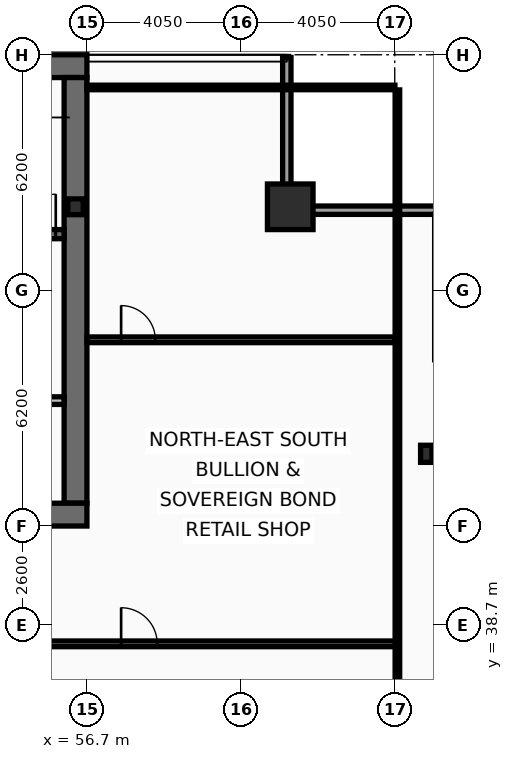
"""IFC4 building model, lengths in metres.
Left out: names, types, materials, properties, quantities, classifications, styles, units other than length and angle.
Written with IfcOpenShell. Run it as: python <this file> out.ifc"""

import sys

from ifc_helpers import new_model, si_unit, direction, frame, frame_2d, origin, origin_2d, place, context, subcontext, project, spatial, rectangle, hollow_rectangle, i_section, extrude, element, fill, save


model = new_model("IFC4")
c1 = context("Model", 3, precision=1e-05, world=origin(), true_north=direction((0.0, 1.0)))
c2 = subcontext(c1, "Body", "Model", "MODEL_VIEW")
j1 = project(units=[si_unit("LENGTHUNIT", "METRE"), si_unit("PLANEANGLEUNIT", "RADIAN")], contexts=[c1])
p1 = place(None, origin())
s1 = spatial("IfcSite", under=j1, at=p1, CompositionType="ELEMENT")
p2 = place(p1, origin())
s2 = spatial("IfcBuilding", under=s1, at=p2, CompositionType="ELEMENT")
p3 = place(p2, frame((0.0, 0.0, 195.8)))
s3 = spatial("IfcBuildingStorey", under=s2, at=p3, CompositionType="ELEMENT", Elevation=195.8)
p4 = place(p3, frame((16.2, 53.4, 0.0), z_axis=(0.0, 0.0, 1.0), x_axis=(1.0, 0.0, 0.0)))
e1 = element("IfcWall", 1, at=p4, inside=s3, PredefinedType="SHEAR", context=c2, shape_type="SweptSolid", body=[
    extrude(rectangle(XDim=40.5, YDim=0.6, at=frame_2d((20.25, 0.0))), origin(), (0.0, 0.0, 1.0), 3.44),
])
p5 = place(p3, frame((56.4, 53.1, 0.0), z_axis=(0.0, 0.0, 1.0), x_axis=(0.0, -1.0, 0.0)))
e2 = element("IfcWall", 2, at=p5, inside=s3, PredefinedType="SHEAR", context=c2, shape_type="SweptSolid", body=[
    extrude(rectangle(XDim=11.2, YDim=0.6, at=frame_2d((5.6, 0.0))), origin(), (0.0, 0.0, 1.0), 3.44),
])
p6 = place(p3, frame((56.7, 41.6, 0.0), z_axis=(0.0, 0.0, 1.0), x_axis=(-1.0, 0.0, 0.0)))
e3 = element("IfcWall", 3, at=p6, inside=s3, PredefinedType="SHEAR", context=c2, shape_type="SweptSolid", body=[
    extrude(rectangle(XDim=2.45, YDim=0.6, at=frame_2d((1.225, 0.0))), origin(), (0.0, 0.0, 1.0), 3.44),
])
p7 = place(p3, frame((48.63, 48.98, 0.0), z_axis=(0.0, 0.0, 1.0), x_axis=(1.0, 0.0, 0.0)))
e4 = element("IfcWall", 4, at=p7, inside=s3, PredefinedType="SHEAR", context=c2, shape_type="SweptSolid", body=[
    extrude(rectangle(XDim=7.47, YDim=0.24, at=frame_2d((3.735, 0.0))), origin(), (0.0, 0.0, 1.0), 3.44),
])
p8 = place(p7, frame((6.2, 0.0, 0.0)))
e5 = element("IfcOpeningElement", 5, at=p8, cuts=e4, PredefinedType="OPENING", context=c2, shape_type="SweptSolid", body=[
    extrude(rectangle(XDim=1.05, YDim=2.15, at=frame_2d((0.525, 1.075))), frame((0.0, 0.13, 0.0), z_axis=(0.0, -1.0, 0.0), x_axis=(1.0, 0.0, 0.0)), (0.0, 0.0, 1.0), 0.26),
])
p9 = place(p3, frame((62.05, 49.7, 0.0), z_axis=(0.0, 0.0, 1.0), x_axis=(1.0, 0.0, 0.0)))
e6 = element("IfcColumn", 6, at=p9, inside=s3, PredefinedType="COLUMN", context=c2, shape_type="SweptSolid", body=[
    extrude(hollow_rectangle(XDim=1.2, YDim=1.2, WallThickness=0.06, at=origin_2d()), origin(), (0.0, 0.0, 1.0), 3.6),
])
p10 = place(p3, frame((65.63, 43.2, 0.0), z_axis=(0.0, 0.0, 1.0), x_axis=(1.0, 0.0, 0.0)))
e7 = element("IfcColumn", 7, at=p10, inside=s3, PredefinedType="COLUMN", context=c2, shape_type="SweptSolid", body=[
    extrude(i_section(OverallWidth=0.3, OverallDepth=0.45, WebThickness=0.014, FlangeThickness=0.026, at=origin_2d()), origin(), (0.0, 0.0, 1.0), 3.6),
])
p11 = place(p3, frame((56.4, 49.7, 0.0), z_axis=(0.0, 0.0, 1.0), x_axis=(1.0, 0.0, 0.0)))
e8 = element("IfcColumn", 8, at=p11, inside=s3, PredefinedType="COLUMN", context=c2, shape_type="SweptSolid", body=[
    extrude(i_section(OverallWidth=0.406, OverallDepth=0.416, WebThickness=0.03, FlangeThickness=0.048, at=origin_2d()), origin(), (0.0, 0.0, 1.0), 3.6),
])
p12 = place(p3, frame((61.96, 53.63, 0.0), z_axis=(0.0, 0.0, 1.0), x_axis=(0.0, -1.0, 0.0)))
e9 = element("IfcWall", 9, at=p12, inside=s3, PredefinedType="SOLIDWALL", context=c2, shape_type="SweptSolid", body=[
    extrude(rectangle(XDim=3.91, YDim=0.22, at=frame_2d((1.955, 0.0))), origin(), (0.0, 0.0, 1.0), 2.83),
])
p13 = place(p3, frame((61.85, 49.61, 0.0), z_axis=(0.0, 0.0, 1.0), x_axis=(1.0, 0.0, 0.0)))
e10 = element("IfcWall", 10, at=p13, inside=s3, PredefinedType="SOLIDWALL", context=c2, shape_type="SweptSolid", body=[
    extrude(rectangle(XDim=4.22, YDim=0.22, at=frame_2d((2.11, 0.0))), origin(), (0.0, 0.0, 1.0), 2.83),
])
p14 = place(p3, frame((51.9, 44.6, 0.0), z_axis=(0.0, 0.0, 1.0), x_axis=(1.0, 0.0, 0.0)))
e11 = element("IfcWall", 11, at=p14, inside=s3, PredefinedType="PARTITIONING", context=c2, shape_type="SweptSolid", body=[
    extrude(rectangle(XDim=4.2, YDim=0.2, at=frame_2d((2.1, 0.0))), origin(), (0.0, 0.0, 1.0), 3.44),
])
p15 = place(p14, frame((1.15, 0.0, 0.0)))
e12 = element("IfcOpeningElement", 12, at=p15, cuts=e11, PredefinedType="OPENING", context=c2, shape_type="SweptSolid", body=[
    extrude(rectangle(XDim=1.05, YDim=2.15, at=frame_2d((0.525, 1.075))), frame((0.0, 0.11, 0.0), z_axis=(0.0, -1.0, 0.0), x_axis=(1.0, 0.0, 0.0)), (0.0, 0.0, 1.0), 0.22),
])
p16 = place(p3, frame((54.35, 38.2, 0.0), z_axis=(0.0, 0.0, 1.0), x_axis=(1.0, 0.0, 0.0)))
e13 = element("IfcWall", 13, at=p16, inside=s3, PredefinedType="PARTITIONING", context=c2, shape_type="SweptSolid", body=[
    extrude(rectangle(XDim=10.52, YDim=0.15, at=frame_2d((5.26, 0.0))), origin(), (0.0, 0.0, 1.0), 2.73),
])
p17 = place(p16, frame((3.25, 0.0, 0.0)))
e14 = element("IfcOpeningElement", 14, at=p17, cuts=e13, PredefinedType="OPENING", context=c2, shape_type="SweptSolid", body=[
    extrude(rectangle(XDim=0.95, YDim=2.05, at=frame_2d((0.475, 1.025))), frame((0.0, 0.085, 0.0), z_axis=(0.0, -1.0, 0.0), x_axis=(1.0, 0.0, 0.0)), (0.0, 0.0, 1.0), 0.17),
])
p18 = place(p3, frame((56.7, 46.2, 0.0), z_axis=(0.0, 0.0, 1.0), x_axis=(1.0, 0.0, 0.0)))
e15 = element("IfcWall", 15, at=p18, inside=s3, PredefinedType="PARTITIONING", context=c2, shape_type="SweptSolid", body=[
    extrude(rectangle(XDim=8.105, YDim=0.15, at=frame_2d((4.052, 0.0))), origin(), (0.0, 0.0, 1.0), 2.83),
])
p19 = place(p18, frame((0.9, 0.0, 0.0)))
e16 = element("IfcOpeningElement", 16, at=p19, cuts=e15, PredefinedType="OPENING", context=c2, shape_type="SweptSolid", body=[
    extrude(rectangle(XDim=0.9, YDim=2.05, at=frame_2d((0.45, 1.025))), frame((0.0, 0.085, 0.0), z_axis=(0.0, -1.0, 0.0), x_axis=(1.0, 0.0, 0.0)), (0.0, 0.0, 1.0), 0.17),
])
p20 = place(p3, frame((64.87, 10.665, 0.0), z_axis=(0.0, 0.0, 1.0), x_axis=(0.0, 1.0, 0.0)))
e17 = element("IfcWall", 17, at=p20, inside=s3, PredefinedType="PARTITIONING", context=c2, shape_type="SweptSolid", body=[
    extrude(rectangle(XDim=42.11, YDim=0.12, at=frame_2d((21.055, 0.0))), origin(), (0.0, 0.0, 1.0), 2.73),
])
p21 = place(p3, frame((56.7, 52.84, 0.0), z_axis=(0.0, 0.0, 1.0), x_axis=(1.0, 0.0, 0.0)))
e18 = element("IfcWall", 18, at=p21, inside=s3, PredefinedType="PARTITIONING", context=c2, shape_type="SweptSolid", body=[
    extrude(rectangle(XDim=8.105, YDim=0.12, at=frame_2d((4.052, 0.0))), origin(), (0.0, 0.0, 1.0), 3.44),
])
p22 = place(p8, origin())
e19 = element("IfcDoor", 19, at=p22, inside=s3, OperationType="SINGLE_SWING_RIGHT", PredefinedType="DOOR", context=c2, shape_type="SweptSolid", body=[
    extrude(rectangle(XDim=1.05, YDim=2.15, at=frame_2d((0.525, 1.075))), frame((0.0, 0.025, 0.0), z_axis=(0.0, -1.0, 0.0), x_axis=(1.0, 0.0, 0.0)), (0.0, 0.0, 1.0), 0.05),
])
fill(e5, e19)
p23 = place(p17, origin())
e20 = element("IfcDoor", 20, at=p23, inside=s3, OperationType="SINGLE_SWING_LEFT", PredefinedType="DOOR", context=c2, shape_type="SweptSolid", body=[
    extrude(rectangle(XDim=0.95, YDim=2.05, at=frame_2d((0.475, 1.025))), frame((0.0, 0.025, 0.0), z_axis=(0.0, -1.0, 0.0), x_axis=(1.0, 0.0, 0.0)), (0.0, 0.0, 1.0), 0.05),
])
fill(e14, e20)
p24 = place(p19, origin())
e21 = element("IfcDoor", 21, at=p24, inside=s3, OperationType="SINGLE_SWING_LEFT", PredefinedType="DOOR", context=c2, shape_type="SweptSolid", body=[
    extrude(rectangle(XDim=0.9, YDim=2.05, at=frame_2d((0.45, 1.025))), frame((0.0, 0.025, 0.0), z_axis=(0.0, -1.0, 0.0), x_axis=(1.0, 0.0, 0.0)), (0.0, 0.0, 1.0), 0.05),
])
fill(e16, e21)
save(model, sys.argv[1])
